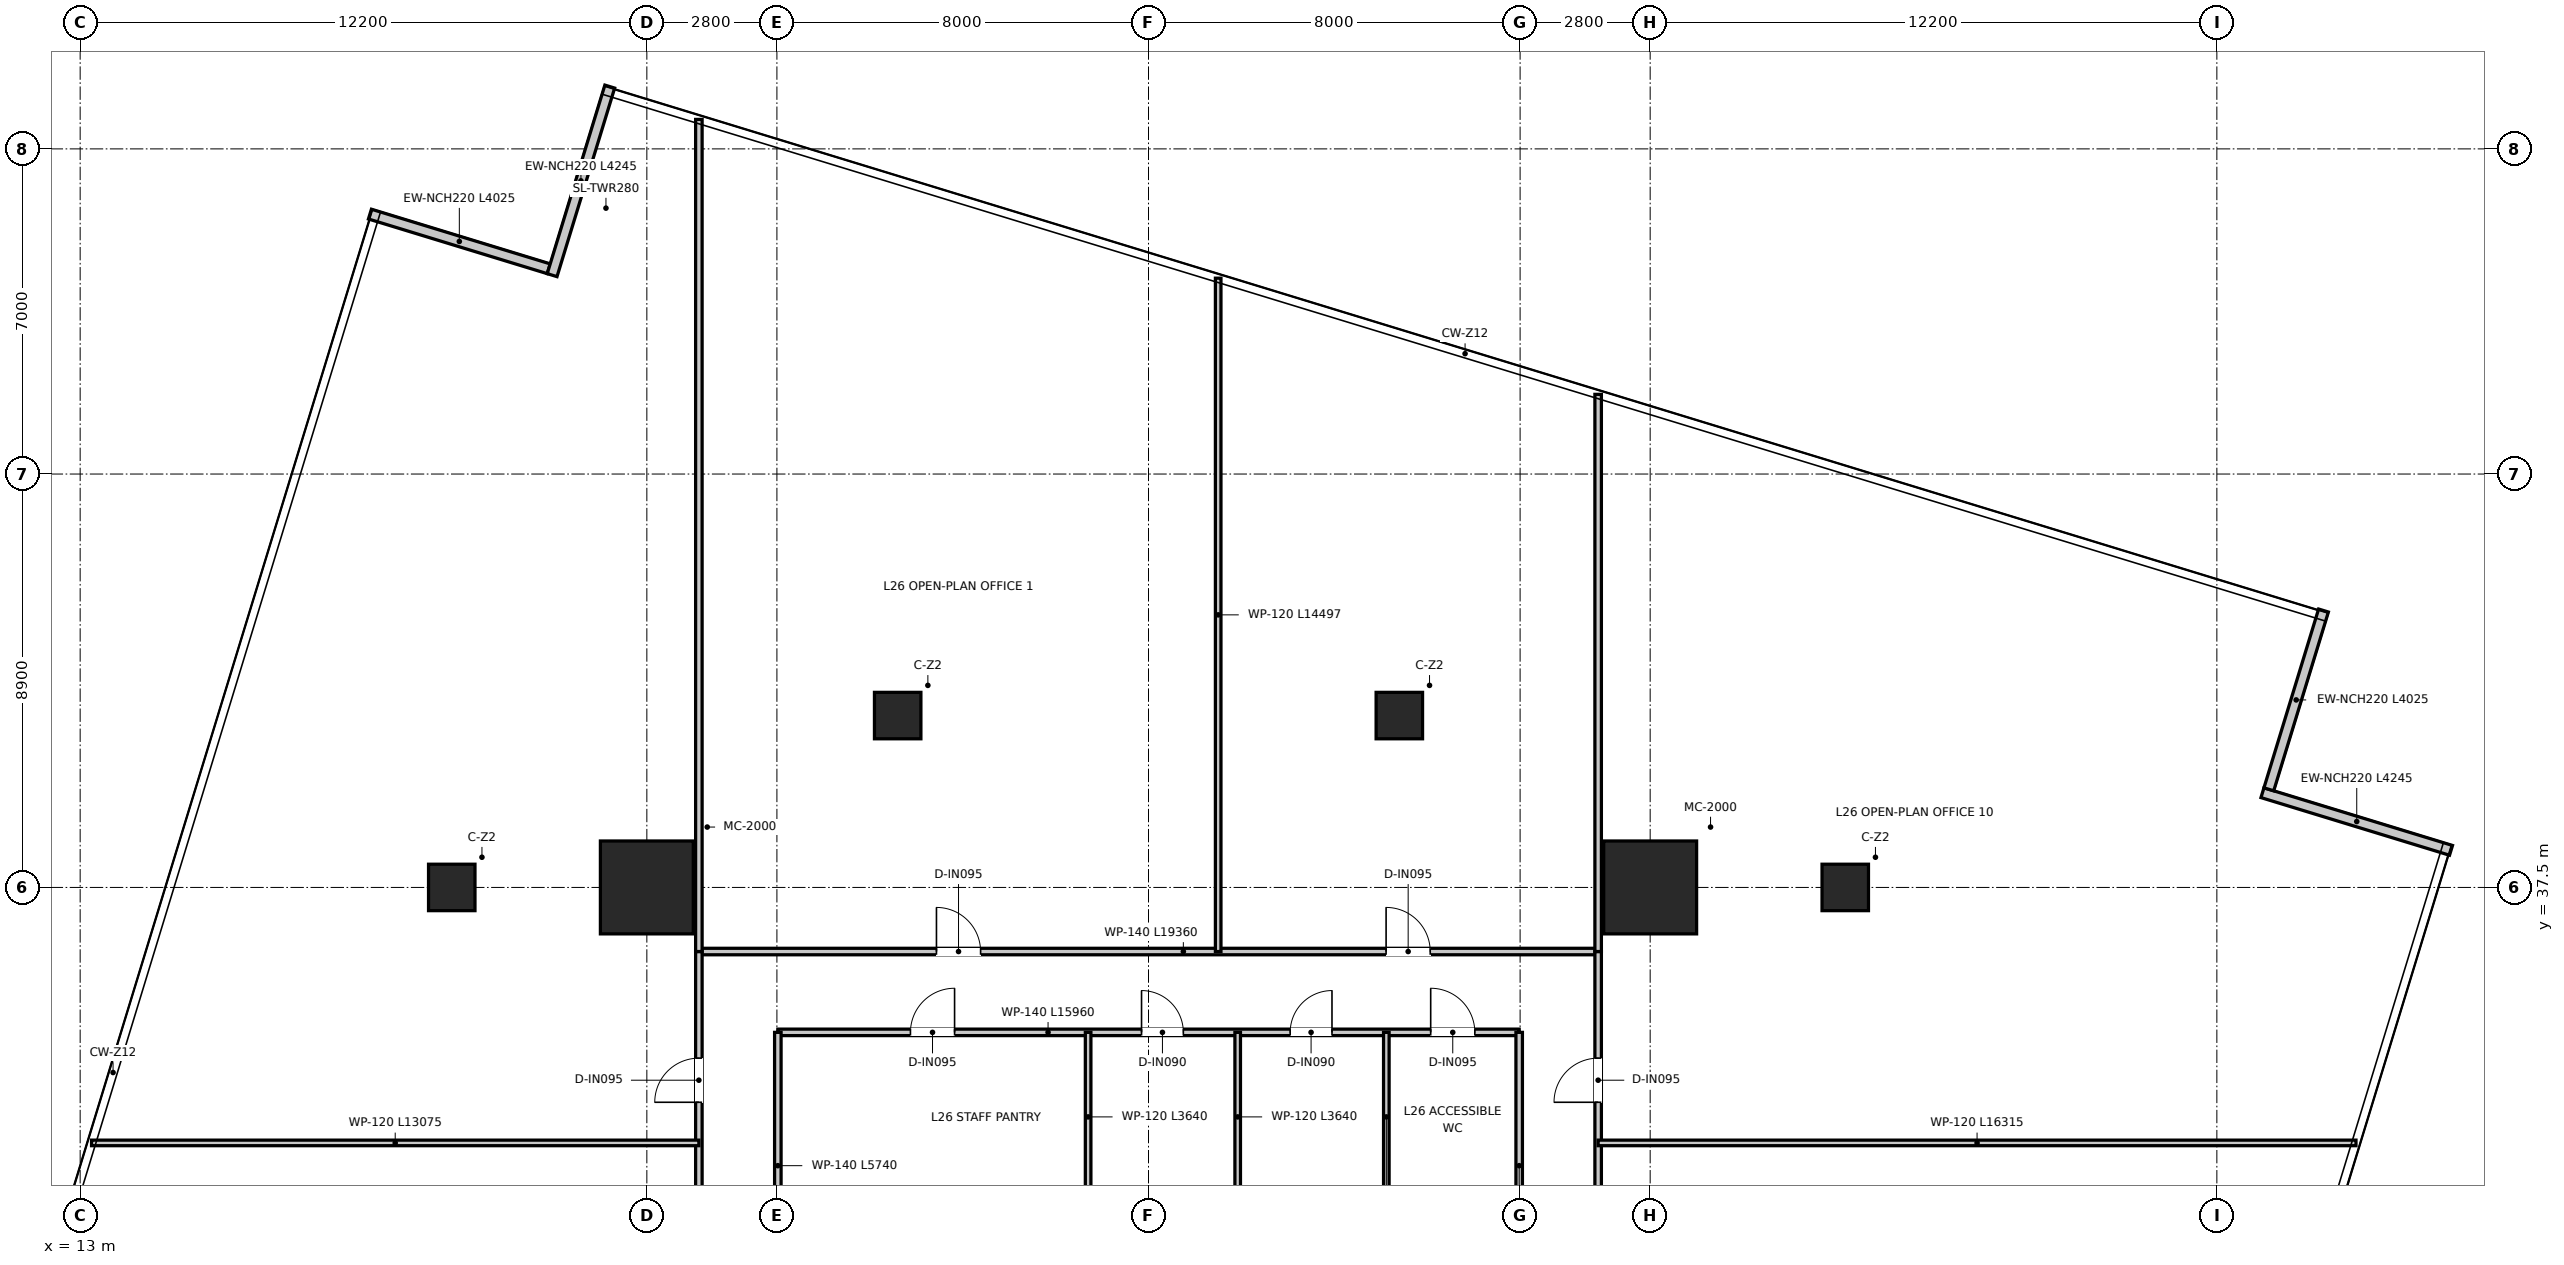
"""IFC4 building model, lengths in metres.
Left out: names, types, materials, properties, quantities, classifications, styles, units other than length and angle.
Written with IfcOpenShell. Run it as: python <this file> out.ifc"""

import sys

from ifc_helpers import new_model, si_unit, direction, frame, frame_2d, origin, origin_2d, place, context, subcontext, project, spatial, rectangle, extrude, source, transform, mapped, element, fill, save


model = new_model("IFC4")
c1 = context("Model", 3, precision=1e-05, world=origin(), true_north=direction((0.0, 1.0)))
c2 = subcontext(c1, "Body", "Model", "MODEL_VIEW")
j1 = project(units=[si_unit("LENGTHUNIT", "METRE"), si_unit("PLANEANGLEUNIT", "RADIAN")], contexts=[c1])
p1 = place(None, origin())
s1 = spatial("IfcSite", under=j1, at=p1, CompositionType="ELEMENT")
p2 = place(p1, origin())
s2 = spatial("IfcBuilding", under=s1, at=p2, CompositionType="ELEMENT")
p3 = place(p2, frame((0.0, 0.0, 109.8)))
s3 = spatial("IfcBuildingStorey", under=s2, at=p3, CompositionType="ELEMENT", Elevation=109.8)
m1 = source(origin(), c2, "Body", "SweptSolid", [
    extrude(rectangle(XDim=2.0, YDim=2.0, at=origin_2d()), origin(), (0.0, 0.0, 1.0), 3.95),
])
for number, where, z_axis, x_axis in (
    (1, (46.8, 37.5, 0.0), (0.0, 0.0, 1.0), (1.0, 0.0, 0.0)),
    (2, (25.2, 37.5, 0.0), (0.0, 0.0, 1.0), (1.0, 0.0, 0.0)),
):
    element("IfcColumn", number, at=place(p3, frame(where, z_axis=z_axis, x_axis=x_axis)), inside=s3, PredefinedType="USERDEFINED", context=c2, shape_type="MappedRepresentation", body=[
        mapped(m1, transform((0.0, 0.0, 0.0), x_axis=(1.0, 0.0, 0.0), y_axis=(0.0, 1.0, 0.0), z_axis=(0.0, 0.0, 1.0), scale=1.0)),
    ])
m2 = source(origin(), c2, "Body", "SweptSolid", [
    extrude(rectangle(XDim=1.0, YDim=1.0, at=origin_2d()), origin(), (0.0, 0.0, 1.0), 3.95),
])
for number, where, z_axis, x_axis in (
    (3, (21.0, 37.5, 0.0), (0.0, 0.0, 1.0), (1.0, 0.0, 0.0)),
    (4, (30.6, 41.2, 0.0), (0.0, 0.0, 1.0), (1.0, 0.0, 0.0)),
    (5, (41.4, 41.2, 0.0), (0.0, 0.0, 1.0), (1.0, 0.0, 0.0)),
    (6, (51.0, 37.5, 0.0), (0.0, 0.0, 1.0), (1.0, 0.0, 0.0)),
):
    element("IfcColumn", number, at=place(p3, frame(where, z_axis=z_axis, x_axis=x_axis)), inside=s3, PredefinedType="COLUMN", context=c2, shape_type="MappedRepresentation", body=[
        mapped(m2, transform((0.0, 0.0, 0.0), x_axis=(1.0, 0.0, 0.0), y_axis=(0.0, 1.0, 0.0), z_axis=(0.0, 0.0, 1.0), scale=1.0)),
    ])
p4 = place(p3, frame((23.088, 50.819, 0.0), z_axis=(0.0, 0.0, 1.0), x_axis=(-0.956307298529, 0.292363388235, 0.0)))
e7 = element("IfcWall", 7, at=p4, inside=s3, PredefinedType="ELEMENTEDWALL", context=c2, shape_type="SweptSolid", body=[
    extrude(rectangle(XDim=4.025, YDim=0.22, at=frame_2d((2.012, 0.0))), origin(), (0.0, 0.0, 1.0), 3.67),
])
p5 = place(p3, frame((64.041, 38.298, 0.0), z_axis=(0.0, 0.0, 1.0), x_axis=(-0.95629976735, 0.292388021242, 0.0)))
e8 = element("IfcWall", 8, at=p5, inside=s3, PredefinedType="ELEMENTEDWALL", context=c2, shape_type="SweptSolid", body=[
    extrude(rectangle(XDim=4.245, YDim=0.22, at=frame_2d((2.123, 0.0))), origin(), (0.0, 0.0, 1.0), 3.67),
])
p6 = place(p3, frame((60.119, 39.613, 0.0), z_axis=(0.0, 0.0, 1.0), x_axis=(0.292363388235, 0.956307298529, 0.0)))
e9 = element("IfcWall", 9, at=p6, inside=s3, PredefinedType="ELEMENTEDWALL", context=c2, shape_type="SweptSolid", body=[
    extrude(rectangle(XDim=4.025, YDim=0.22, at=frame_2d((2.012, 0.0))), origin(), (0.0, 0.0, 1.0), 3.67),
])
p7 = place(p3, frame((24.402, 54.741, 0.0), z_axis=(0.0, 0.0, 1.0), x_axis=(-0.292351504488, -0.956310931561, 0.0)))
e10 = element("IfcWall", 10, at=p7, inside=s3, PredefinedType="ELEMENTEDWALL", context=c2, shape_type="SweptSolid", body=[
    extrude(rectangle(XDim=4.245, YDim=0.22, at=frame_2d((2.123, 0.0))), origin(), (0.0, 0.0, 1.0), 3.67),
])
p8 = place(p3, frame((28.02, 34.38, 0.0), z_axis=(0.0, 0.0, 1.0), x_axis=(1.0, 0.0, 0.0)))
e11 = element("IfcWall", 11, at=p8, inside=s3, PredefinedType="PARTITIONING", context=c2, shape_type="SweptSolid", body=[
    extrude(rectangle(XDim=15.96, YDim=0.14, at=frame_2d((7.98, 0.0))), origin(), (0.0, 0.0, 1.0), 3.08),
])
p9 = place(p8, frame((7.83, 0.0, 0.0)))
e12 = element("IfcOpeningElement", 12, at=p9, cuts=e11, PredefinedType="OPENING", context=c2, shape_type="SweptSolid", body=[
    extrude(rectangle(XDim=0.9, YDim=2.1, at=frame_2d((0.45, 1.05))), frame((0.0, 0.08, 0.0), z_axis=(0.0, -1.0, 0.0), x_axis=(1.0, 0.0, 0.0)), (0.0, 0.0, 1.0), 0.16),
])
p10 = place(p8, frame((11.03, 0.0, 0.0)))
e13 = element("IfcOpeningElement", 13, at=p10, cuts=e11, PredefinedType="OPENING", context=c2, shape_type="SweptSolid", body=[
    extrude(rectangle(XDim=0.9, YDim=2.1, at=frame_2d((0.45, 1.05))), frame((0.0, 0.08, 0.0), z_axis=(0.0, -1.0, 0.0), x_axis=(1.0, 0.0, 0.0)), (0.0, 0.0, 1.0), 0.16),
])
p11 = place(p8, frame((14.055, 0.0, 0.0)))
e14 = element("IfcOpeningElement", 14, at=p11, cuts=e11, PredefinedType="OPENING", context=c2, shape_type="SweptSolid", body=[
    extrude(rectangle(XDim=0.95, YDim=2.1, at=frame_2d((0.475, 1.05))), frame((0.0, 0.08, 0.0), z_axis=(0.0, -1.0, 0.0), x_axis=(1.0, 0.0, 0.0)), (0.0, 0.0, 1.0), 0.16),
])
p12 = place(p8, frame((2.855, 0.0, 0.0)))
e15 = element("IfcOpeningElement", 15, at=p12, cuts=e11, PredefinedType="OPENING", context=c2, shape_type="SweptSolid", body=[
    extrude(rectangle(XDim=0.95, YDim=2.1, at=frame_2d((0.475, 1.05))), frame((0.0, 0.08, 0.0), z_axis=(0.0, -1.0, 0.0), x_axis=(1.0, 0.0, 0.0)), (0.0, 0.0, 1.0), 0.16),
])
for number, where, z_axis, x_axis in (
    (16, (28.02, 28.64, 0.0), (0.0, 0.0, 1.0), (0.0, 1.0, 0.0)),
    (17, (43.98, 28.64, 0.0), (0.0, 0.0, 1.0), (0.0, 1.0, 0.0)),
):
    element("IfcWall", number, at=place(p3, frame(where, z_axis=z_axis, x_axis=x_axis)), inside=s3, PredefinedType="PARTITIONING", context=c2, shape_type="SweptSolid", body=[
        extrude(rectangle(XDim=5.74, YDim=0.14, at=frame_2d((2.87, 0.0))), origin(), (0.0, 0.0, 1.0), 3.27),
    ])
for number, where, z_axis, x_axis in (
    (18, (37.92, 30.74, 0.0), (0.0, 0.0, 1.0), (0.0, 1.0, 0.0)),
    (19, (41.12, 30.74, 0.0), (0.0, 0.0, 1.0), (0.0, 1.0, 0.0)),
    (20, (34.7, 30.74, 0.0), (0.0, 0.0, 1.0), (0.0, 1.0, 0.0)),
):
    element("IfcWall", number, at=place(p3, frame(where, z_axis=z_axis, x_axis=x_axis)), inside=s3, PredefinedType="PARTITIONING", context=c2, shape_type="SweptSolid", body=[
        extrude(rectangle(XDim=3.64, YDim=0.12, at=frame_2d((1.82, 0.0))), origin(), (0.0, 0.0, 1.0), 3.17),
    ])
p13 = place(p3, frame((26.32, 36.12, 0.0), z_axis=(0.0, 0.0, 1.0), x_axis=(1.0, 0.0, 0.0)))
e21 = element("IfcWall", 21, at=p13, inside=s3, PredefinedType="PARTITIONING", context=c2, shape_type="SweptSolid", body=[
    extrude(rectangle(XDim=19.36, YDim=0.14, at=frame_2d((9.68, 0.0))), origin(), (0.0, 0.0, 1.0), 3.08),
])
p14 = place(p13, frame((5.115, 0.0, 0.0)))
e22 = element("IfcOpeningElement", 22, at=p14, cuts=e21, PredefinedType="OPENING", context=c2, shape_type="SweptSolid", body=[
    extrude(rectangle(XDim=0.95, YDim=2.1, at=frame_2d((0.475, 1.05))), frame((0.0, 0.08, 0.0), z_axis=(0.0, -1.0, 0.0), x_axis=(1.0, 0.0, 0.0)), (0.0, 0.0, 1.0), 0.16),
])
p15 = place(p13, frame((14.795, 0.0, 0.0)))
e23 = element("IfcOpeningElement", 23, at=p15, cuts=e21, PredefinedType="OPENING", context=c2, shape_type="SweptSolid", body=[
    extrude(rectangle(XDim=0.95, YDim=2.1, at=frame_2d((0.475, 1.05))), frame((0.0, 0.08, 0.0), z_axis=(0.0, -1.0, 0.0), x_axis=(1.0, 0.0, 0.0)), (0.0, 0.0, 1.0), 0.16),
])
p16 = place(p3, frame((26.32, 10.5, 0.0), z_axis=(0.0, 0.0, 1.0), x_axis=(0.0, 1.0, 0.0)))
e24 = element("IfcWall", 24, at=p16, inside=s3, PredefinedType="PARTITIONING", context=c2, shape_type="SweptSolid", body=[
    extrude(rectangle(XDim=25.62, YDim=0.14, at=frame_2d((12.81, 0.0))), origin(), (0.0, 0.0, 1.0), 2.97),
])
p17 = place(p16, frame((8.275, 0.0, 0.0)))
e25 = element("IfcOpeningElement", 25, at=p17, cuts=e24, PredefinedType="OPENING", context=c2, shape_type="SweptSolid", body=[
    extrude(rectangle(XDim=0.95, YDim=2.1, at=frame_2d((0.475, 1.05))), frame((0.0, 0.08, 0.0), z_axis=(0.0, -1.0, 0.0), x_axis=(1.0, 0.0, 0.0)), (0.0, 0.0, 1.0), 0.16),
])
p18 = place(p16, frame((12.775, 0.0, 0.0)))
e26 = element("IfcOpeningElement", 26, at=p18, cuts=e24, PredefinedType="OPENING", context=c2, shape_type="SweptSolid", body=[
    extrude(rectangle(XDim=0.95, YDim=2.1, at=frame_2d((0.475, 1.05))), frame((0.0, 0.08, 0.0), z_axis=(0.0, -1.0, 0.0), x_axis=(1.0, 0.0, 0.0)), (0.0, 0.0, 1.0), 0.16),
])
p19 = place(p16, frame((18.275, 0.0, 0.0)))
e27 = element("IfcOpeningElement", 27, at=p19, cuts=e24, PredefinedType="OPENING", context=c2, shape_type="SweptSolid", body=[
    extrude(rectangle(XDim=0.95, YDim=2.1, at=frame_2d((0.475, 1.05))), frame((0.0, 0.08, 0.0), z_axis=(0.0, -1.0, 0.0), x_axis=(1.0, 0.0, 0.0)), (0.0, 0.0, 1.0), 0.16),
])
p20 = place(p16, frame((22.375, 0.0, 0.0)))
e28 = element("IfcOpeningElement", 28, at=p20, cuts=e24, PredefinedType="OPENING", context=c2, shape_type="SweptSolid", body=[
    extrude(rectangle(XDim=0.95, YDim=2.1, at=frame_2d((0.475, 1.05))), frame((0.0, 0.08, 0.0), z_axis=(0.0, -1.0, 0.0), x_axis=(1.0, 0.0, 0.0)), (0.0, 0.0, 1.0), 0.16),
])
p21 = place(p3, frame((45.68, 10.5, 0.0), z_axis=(0.0, 0.0, 1.0), x_axis=(0.0, 1.0, 0.0)))
e29 = element("IfcWall", 29, at=p21, inside=s3, PredefinedType="PARTITIONING", context=c2, shape_type="SweptSolid", body=[
    extrude(rectangle(XDim=25.62, YDim=0.14, at=frame_2d((12.81, 0.0))), origin(), (0.0, 0.0, 1.0), 2.97),
])
p22 = place(p21, frame((8.275, 0.0, 0.0)))
e30 = element("IfcOpeningElement", 30, at=p22, cuts=e29, PredefinedType="OPENING", context=c2, shape_type="SweptSolid", body=[
    extrude(rectangle(XDim=0.95, YDim=2.1, at=frame_2d((0.475, 1.05))), frame((0.0, 0.08, 0.0), z_axis=(0.0, -1.0, 0.0), x_axis=(1.0, 0.0, 0.0)), (0.0, 0.0, 1.0), 0.16),
])
p23 = place(p21, frame((12.775, 0.0, 0.0)))
e31 = element("IfcOpeningElement", 31, at=p23, cuts=e29, PredefinedType="OPENING", context=c2, shape_type="SweptSolid", body=[
    extrude(rectangle(XDim=0.95, YDim=2.1, at=frame_2d((0.475, 1.05))), frame((0.0, 0.08, 0.0), z_axis=(0.0, -1.0, 0.0), x_axis=(1.0, 0.0, 0.0)), (0.0, 0.0, 1.0), 0.16),
])
p24 = place(p21, frame((18.275, 0.0, 0.0)))
e32 = element("IfcOpeningElement", 32, at=p24, cuts=e29, PredefinedType="OPENING", context=c2, shape_type="SweptSolid", body=[
    extrude(rectangle(XDim=0.95, YDim=2.1, at=frame_2d((0.475, 1.05))), frame((0.0, 0.08, 0.0), z_axis=(0.0, -1.0, 0.0), x_axis=(1.0, 0.0, 0.0)), (0.0, 0.0, 1.0), 0.16),
])
p25 = place(p21, frame((22.375, 0.0, 0.0)))
e33 = element("IfcOpeningElement", 33, at=p25, cuts=e29, PredefinedType="OPENING", context=c2, shape_type="SweptSolid", body=[
    extrude(rectangle(XDim=0.95, YDim=2.1, at=frame_2d((0.475, 1.05))), frame((0.0, 0.08, 0.0), z_axis=(0.0, -1.0, 0.0), x_axis=(1.0, 0.0, 0.0)), (0.0, 0.0, 1.0), 0.16),
])
p26 = place(p3, frame((26.32, 36.12, 0.0), z_axis=(0.0, 0.0, 1.0), x_axis=(0.0, 1.0, 0.0)))
e34 = element("IfcWall", 34, at=p26, inside=s3, PredefinedType="PARTITIONING", context=c2, shape_type="SweptSolid", body=[
    extrude(rectangle(XDim=17.914, YDim=0.14, at=frame_2d((8.957, 0.0))), origin(), (0.0, 0.0, 1.0), 2.97),
])
p27 = place(p3, frame((45.68, 36.12, 0.0), z_axis=(0.0, 0.0, 1.0), x_axis=(0.0, 1.0, 0.0)))
e35 = element("IfcWall", 35, at=p27, inside=s3, PredefinedType="PARTITIONING", context=c2, shape_type="SweptSolid", body=[
    extrude(rectangle(XDim=11.995, YDim=0.14, at=frame_2d((5.998, 0.0))), origin(), (0.0, 0.0, 1.0), 2.97),
])
p28 = place(p3, frame((37.5, 36.12, 0.0), z_axis=(0.0, 0.0, 1.0), x_axis=(0.0, 1.0, 0.0)))
e36 = element("IfcWall", 36, at=p28, inside=s3, PredefinedType="PARTITIONING", context=c2, shape_type="SweptSolid", body=[
    extrude(rectangle(XDim=14.496, YDim=0.12, at=frame_2d((7.248, 0.0))), origin(), (0.0, 0.0, 1.0), 2.97),
])
p29 = place(p3, frame((13.245, 32.0, 0.0), z_axis=(0.0, 0.0, 1.0), x_axis=(1.0, 0.0, 0.0)))
e37 = element("IfcWall", 37, at=p29, inside=s3, PredefinedType="PARTITIONING", context=c2, shape_type="SweptSolid", body=[
    extrude(rectangle(XDim=13.075, YDim=0.12, at=frame_2d((6.537, 0.0))), origin(), (0.0, 0.0, 1.0), 2.97),
])
p30 = place(p3, frame((45.68, 32.0, 0.0), z_axis=(0.0, 0.0, 1.0), x_axis=(1.0, 0.0, 0.0)))
e38 = element("IfcWall", 38, at=p30, inside=s3, PredefinedType="PARTITIONING", context=c2, shape_type="SweptSolid", body=[
    extrude(rectangle(XDim=16.315, YDim=0.12, at=frame_2d((8.158, 0.0))), origin(), (0.0, 0.0, 1.0), 2.97),
])
p31 = place(p9, origin())
e39 = element("IfcDoor", 39, at=p31, inside=s3, OperationType="SINGLE_SWING_LEFT", PredefinedType="DOOR", context=c2, shape_type="SweptSolid", body=[
    extrude(rectangle(XDim=0.9, YDim=2.1, at=frame_2d((0.45, 1.05))), frame((0.0, 0.025, 0.0), z_axis=(0.0, -1.0, 0.0), x_axis=(1.0, 0.0, 0.0)), (0.0, 0.0, 1.0), 0.05),
])
fill(e12, e39)
p32 = place(p10, origin())
e40 = element("IfcDoor", 40, at=p32, inside=s3, OperationType="SINGLE_SWING_RIGHT", PredefinedType="DOOR", context=c2, shape_type="SweptSolid", body=[
    extrude(rectangle(XDim=0.9, YDim=2.1, at=frame_2d((0.45, 1.05))), frame((0.0, 0.025, 0.0), z_axis=(0.0, -1.0, 0.0), x_axis=(1.0, 0.0, 0.0)), (0.0, 0.0, 1.0), 0.05),
])
fill(e13, e40)
p33 = place(p11, origin())
e41 = element("IfcDoor", 41, at=p33, inside=s3, OperationType="SINGLE_SWING_LEFT", PredefinedType="DOOR", context=c2, shape_type="SweptSolid", body=[
    extrude(rectangle(XDim=0.95, YDim=2.1, at=frame_2d((0.475, 1.05))), frame((0.0, 0.025, 0.0), z_axis=(0.0, -1.0, 0.0), x_axis=(1.0, 0.0, 0.0)), (0.0, 0.0, 1.0), 0.05),
])
fill(e14, e41)
p34 = place(p12, origin())
e42 = element("IfcDoor", 42, at=p34, inside=s3, OperationType="SINGLE_SWING_RIGHT", PredefinedType="DOOR", context=c2, shape_type="SweptSolid", body=[
    extrude(rectangle(XDim=0.95, YDim=2.1, at=frame_2d((0.475, 1.05))), frame((0.0, 0.025, 0.0), z_axis=(0.0, -1.0, 0.0), x_axis=(1.0, 0.0, 0.0)), (0.0, 0.0, 1.0), 0.05),
])
fill(e15, e42)
p35 = place(p14, origin())
e43 = element("IfcDoor", 43, at=p35, inside=s3, OperationType="SINGLE_SWING_LEFT", PredefinedType="DOOR", context=c2, shape_type="SweptSolid", body=[
    extrude(rectangle(XDim=0.95, YDim=2.1, at=frame_2d((0.475, 1.05))), frame((0.0, 0.025, 0.0), z_axis=(0.0, -1.0, 0.0), x_axis=(1.0, 0.0, 0.0)), (0.0, 0.0, 1.0), 0.05),
])
fill(e22, e43)
p36 = place(p15, origin())
e44 = element("IfcDoor", 44, at=p36, inside=s3, OperationType="SINGLE_SWING_LEFT", PredefinedType="DOOR", context=c2, shape_type="SweptSolid", body=[
    extrude(rectangle(XDim=0.95, YDim=2.1, at=frame_2d((0.475, 1.05))), frame((0.0, 0.025, 0.0), z_axis=(0.0, -1.0, 0.0), x_axis=(1.0, 0.0, 0.0)), (0.0, 0.0, 1.0), 0.05),
])
fill(e23, e44)
p37 = place(p20, origin())
e45 = element("IfcDoor", 45, at=p37, inside=s3, OperationType="SINGLE_SWING_LEFT", PredefinedType="DOOR", context=c2, shape_type="SweptSolid", body=[
    extrude(rectangle(XDim=0.95, YDim=2.1, at=frame_2d((0.475, 1.05))), frame((0.0, 0.025, 0.0), z_axis=(0.0, -1.0, 0.0), x_axis=(1.0, 0.0, 0.0)), (0.0, 0.0, 1.0), 0.05),
])
fill(e28, e45)
p38 = place(p25, origin())
e46 = element("IfcDoor", 46, at=p38, inside=s3, OperationType="SINGLE_SWING_LEFT", PredefinedType="DOOR", context=c2, shape_type="SweptSolid", body=[
    extrude(rectangle(XDim=0.95, YDim=2.1, at=frame_2d((0.475, 1.05))), frame((0.0, 0.025, 0.0), z_axis=(0.0, -1.0, 0.0), x_axis=(1.0, 0.0, 0.0)), (0.0, 0.0, 1.0), 0.05),
])
fill(e33, e46)
save(model, sys.argv[1])
